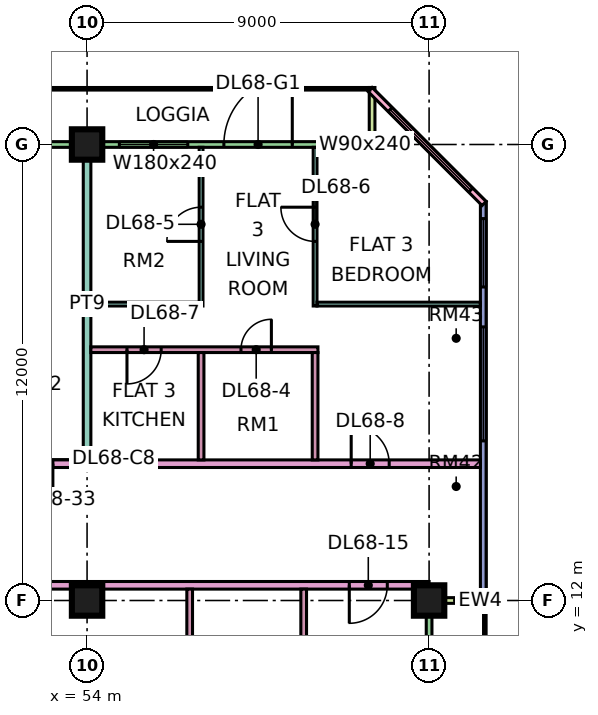
"""IFC4 building model, lengths in metres.
Left out: names, types, materials, properties, quantities, classifications, styles, units other than length and angle.
Written with IfcOpenShell. Run it as: python <this file> out.ifc"""

import sys

from ifc_helpers import new_model, si_unit, direction, frame, frame_2d, origin, origin_2d, place, context, subcontext, project, spatial, rectangle, extrude, element, fill, save


model = new_model("IFC4")
c1 = context("Model", 3, precision=1e-05, world=origin(), true_north=direction((0.0, 1.0)))
c2 = subcontext(c1, "Body", "Model", "MODEL_VIEW")
j1 = project(units=[si_unit("LENGTHUNIT", "METRE"), si_unit("PLANEANGLEUNIT", "RADIAN")], contexts=[c1])
p1 = place(None, origin())
s1 = spatial("IfcSite", under=j1, at=p1, CompositionType="ELEMENT")
p2 = place(p1, origin())
s2 = spatial("IfcBuilding", under=s1, at=p2, CompositionType="ELEMENT")
p3 = place(p2, frame((0.0, 0.0, 292.15)))
s3 = spatial("IfcBuildingStorey", under=s2, at=p3, CompositionType="ELEMENT", Elevation=292.15)
for number, where, z_axis, x_axis in (
    (1, (54.0, 12.0, 0.0), (0.0, 0.0, 1.0), (1.0, 0.0, 0.0)),
    (2, (54.0, 24.0, 0.0), (0.0, 0.0, 1.0), (1.0, 0.0, 0.0)),
    (3, (63.0, 12.0, 0.0), (0.0, 0.0, 1.0), (1.0, 0.0, 0.0)),
):
    element("IfcColumn", number, at=place(p3, frame(where, z_axis=z_axis, x_axis=x_axis)), inside=s3, PredefinedType="COLUMN", context=c2, shape_type="SweptSolid", body=[
        extrude(rectangle(XDim=0.8, YDim=0.8, at=origin_2d()), origin(), (0.0, 0.0, 1.0), 3.75),
    ])
p4 = place(p3, frame((61.425, 24.0, 0.0), z_axis=(0.0, 0.0, 1.0), x_axis=(-1.0, 0.0, 0.0)))
e4 = element("IfcWall", 4, at=p4, inside=s3, PredefinedType="SOLIDWALL", context=c2, shape_type="SweptSolid", body=[
    extrude(rectangle(XDim=13.35, YDim=0.15, at=frame_2d((6.675, 0.0))), origin(), (0.0, 0.0, 1.0), 3.35),
])
p5 = place(p4, frame((0.262, 0.0, 0.45)))
e5 = element("IfcOpeningElement", 5, at=p5, cuts=e4, PredefinedType="OPENING", context=c2, shape_type="SweptSolid", body=[
    extrude(rectangle(XDim=0.9, YDim=2.4, at=frame_2d((0.45, 1.2))), frame((0.0, 0.085, 0.0), z_axis=(0.0, -1.0, 0.0), x_axis=(1.0, 0.0, 0.0)), (0.0, 0.0, 1.0), 0.17),
])
p6 = place(p4, frame((2.025, 0.0, 0.0)))
e6 = element("IfcOpeningElement", 6, at=p6, cuts=e4, PredefinedType="OPENING", context=c2, shape_type="SweptSolid", body=[
    extrude(rectangle(XDim=1.8, YDim=2.4, at=frame_2d((0.9, 1.2))), frame((0.0, 0.085, 0.0), z_axis=(0.0, -1.0, 0.0), x_axis=(1.0, 0.0, 0.0)), (0.0, 0.0, 1.0), 0.17),
])
p7 = place(p4, frame((4.775, 0.0, 0.45)))
e7 = element("IfcOpeningElement", 7, at=p7, cuts=e4, PredefinedType="OPENING", context=c2, shape_type="SweptSolid", body=[
    extrude(rectangle(XDim=1.8, YDim=2.4, at=frame_2d((0.9, 1.2))), frame((0.0, 0.085, 0.0), z_axis=(0.0, -1.0, 0.0), x_axis=(1.0, 0.0, 0.0)), (0.0, 0.0, 1.0), 0.17),
])
p8 = place(p4, frame((8.538, 0.0, 0.45)))
e8 = element("IfcOpeningElement", 8, at=p8, cuts=e4, PredefinedType="OPENING", context=c2, shape_type="SweptSolid", body=[
    extrude(rectangle(XDim=4.2, YDim=2.4, at=frame_2d((2.1, 1.2))), frame((0.0, 0.085, 0.0), z_axis=(0.0, -1.0, 0.0), x_axis=(1.0, 0.0, 0.0)), (0.0, 0.0, 1.0), 0.17),
])
p9 = place(p3, frame((61.5, 25.5, 0.0), z_axis=(0.0, 0.0, 1.0), x_axis=(0.0, -1.0, 0.0)))
e9 = element("IfcWall", 9, at=p9, inside=s3, PredefinedType="SOLIDWALL", context=c2, shape_type="SweptSolid", body=[
    extrude(rectangle(XDim=1.5, YDim=0.15, at=frame_2d((0.75, 0.0))), origin(), (0.0, 0.0, 1.0), 3.35),
])
p10 = place(p3, frame((63.0, 1.575, 0.0), z_axis=(0.0, 0.0, 1.0), x_axis=(0.0, 1.0, 0.0)))
e10 = element("IfcWall", 10, at=p10, inside=s3, PredefinedType="SOLIDWALL", context=c2, shape_type="SweptSolid", body=[
    extrude(rectangle(XDim=10.35, YDim=0.15, at=frame_2d((5.175, 0.0))), origin(), (0.0, 0.0, 1.0), 3.35),
])
p11 = place(p10, frame((1.812, 0.0, 0.0)))
e11 = element("IfcOpeningElement", 11, at=p11, cuts=e10, PredefinedType="OPENING", context=c2, shape_type="SweptSolid", body=[
    extrude(rectangle(XDim=1.8, YDim=2.4, at=frame_2d((0.9, 1.2))), frame((0.0, 0.085, 0.0), z_axis=(0.0, -1.0, 0.0), x_axis=(1.0, 0.0, 0.0)), (0.0, 0.0, 1.0), 0.17),
])
p12 = place(p10, frame((6.175, 0.0, 0.45)))
e12 = element("IfcOpeningElement", 12, at=p12, cuts=e10, PredefinedType="OPENING", context=c2, shape_type="SweptSolid", body=[
    extrude(rectangle(XDim=3.0, YDim=2.4, at=frame_2d((1.5, 1.2))), frame((0.0, 0.085, 0.0), z_axis=(0.0, -1.0, 0.0), x_axis=(1.0, 0.0, 0.0)), (0.0, 0.0, 1.0), 0.17),
])
p13 = place(p3, frame((64.5, 12.0, 0.0), z_axis=(0.0, 0.0, 1.0), x_axis=(-1.0, 0.0, 0.0)))
e13 = element("IfcWall", 13, at=p13, inside=s3, PredefinedType="SOLIDWALL", context=c2, shape_type="SweptSolid", body=[
    extrude(rectangle(XDim=1.5, YDim=0.15, at=frame_2d((0.75, 0.0))), origin(), (0.0, 0.0, 1.0), 3.35),
])
p14 = place(p3, frame((64.425, 12.075, 0.0), z_axis=(0.0, 0.0, 1.0), x_axis=(0.0, 1.0, 0.0)))
e14 = element("IfcWall", 14, at=p14, inside=s3, PredefinedType="SOLIDWALL", context=c2, shape_type="SweptSolid", body=[
    extrude(rectangle(XDim=10.425, YDim=0.15, at=frame_2d((5.212, 0.0))), origin(), (0.0, 0.0, 1.0), 3.35),
])
p15 = place(p14, frame((4.125, 0.0, 0.45)))
e15 = element("IfcOpeningElement", 15, at=p15, cuts=e14, PredefinedType="OPENING", context=c2, shape_type="SweptSolid", body=[
    extrude(rectangle(XDim=3.0, YDim=2.4, at=frame_2d((1.5, 1.2))), frame((0.0, 0.085, 0.0), z_axis=(0.0, -1.0, 0.0), x_axis=(1.0, 0.0, 0.0)), (0.0, 0.0, 1.0), 0.17),
])
p16 = place(p14, frame((8.175, 0.0, 0.45)))
e16 = element("IfcOpeningElement", 16, at=p16, cuts=e14, PredefinedType="OPENING", context=c2, shape_type="SweptSolid", body=[
    extrude(rectangle(XDim=1.8, YDim=2.4, at=frame_2d((0.9, 1.2))), frame((0.0, 0.085, 0.0), z_axis=(0.0, -1.0, 0.0), x_axis=(1.0, 0.0, 0.0)), (0.0, 0.0, 1.0), 0.17),
])
p17 = place(p3, frame((64.447, 22.447, 0.0), z_axis=(0.0, 0.0, 1.0), x_axis=(-0.707106781187, 0.707106781187, 0.0)))
e17 = element("IfcWall", 17, at=p17, inside=s3, PredefinedType="SOLIDWALL", context=c2, shape_type="SweptSolid", body=[
    extrude(rectangle(XDim=4.243, YDim=0.15, at=frame_2d((2.121, 0.0))), origin(), (0.0, 0.0, 1.0), 3.35),
])
p18 = place(p17, frame((0.498, 0.0, 0.45)))
e18 = element("IfcOpeningElement", 18, at=p18, cuts=e17, PredefinedType="OPENING", context=c2, shape_type="SweptSolid", body=[
    extrude(rectangle(XDim=3.0, YDim=2.4, at=frame_2d((1.5, 1.2))), frame((0.0, 0.085, 0.0), z_axis=(0.0, -1.0, 0.0), x_axis=(1.0, 0.0, 0.0)), (0.0, 0.0, 1.0), 0.17),
])
p19 = place(p3, frame((40.65, 12.4, 0.0), z_axis=(0.0, 0.0, 1.0), x_axis=(1.0, 0.0, 0.0)))
e19 = element("IfcWall", 19, at=p19, inside=s3, PredefinedType="PARTITIONING", context=c2, shape_type="SweptSolid", body=[
    extrude(rectangle(XDim=22.35, YDim=0.2, at=frame_2d((11.175, 0.0))), origin(), (0.0, 0.0, 1.0), 3.35),
])
p20 = place(p19, frame((20.25, 0.0, 0.0)))
e20 = element("IfcOpeningElement", 20, at=p20, cuts=e19, PredefinedType="OPENING", context=c2, shape_type="SweptSolid", body=[
    extrude(rectangle(XDim=1.0, YDim=2.1, at=frame_2d((0.5, 1.05))), frame((0.0, 0.11, 0.0), z_axis=(0.0, -1.0, 0.0), x_axis=(1.0, 0.0, 0.0)), (0.0, 0.0, 1.0), 0.22),
])
p21 = place(p19, frame((1.05, 0.0, 0.0)))
e21 = element("IfcOpeningElement", 21, at=p21, cuts=e19, PredefinedType="OPENING", context=c2, shape_type="SweptSolid", body=[
    extrude(rectangle(XDim=1.0, YDim=2.1, at=frame_2d((0.5, 1.05))), frame((0.0, 0.11, 0.0), z_axis=(0.0, -1.0, 0.0), x_axis=(1.0, 0.0, 0.0)), (0.0, 0.0, 1.0), 0.22),
])
p22 = place(p3, frame((51.225, 15.6, 0.0), z_axis=(0.0, 0.0, 1.0), x_axis=(1.0, 0.0, 0.0)))
e22 = element("IfcWall", 22, at=p22, inside=s3, PredefinedType="PARTITIONING", context=c2, shape_type="SweptSolid", body=[
    extrude(rectangle(XDim=13.125, YDim=0.2, at=frame_2d((6.562, 0.0))), origin(), (0.0, 0.0, 1.0), 3.35),
])
p23 = place(p22, frame((9.725, 0.0, 0.0)))
e23 = element("IfcOpeningElement", 23, at=p23, cuts=e22, PredefinedType="OPENING", context=c2, shape_type="SweptSolid", body=[
    extrude(rectangle(XDim=1.0, YDim=2.1, at=frame_2d((0.5, 1.05))), frame((0.0, 0.11, 0.0), z_axis=(0.0, -1.0, 0.0), x_axis=(1.0, 0.0, 0.0)), (0.0, 0.0, 1.0), 0.22),
])
p24 = place(p22, frame((0.875, 0.0, 0.0)))
e24 = element("IfcOpeningElement", 24, at=p24, cuts=e22, PredefinedType="OPENING", context=c2, shape_type="SweptSolid", body=[
    extrude(rectangle(XDim=1.0, YDim=2.1, at=frame_2d((0.5, 1.05))), frame((0.0, 0.11, 0.0), z_axis=(0.0, -1.0, 0.0), x_axis=(1.0, 0.0, 0.0)), (0.0, 0.0, 1.0), 0.22),
])
p25 = place(p3, frame((54.0, 15.7, 0.0), z_axis=(0.0, 0.0, 1.0), x_axis=(0.0, 1.0, 0.0)))
e25 = element("IfcWall", 25, at=p25, inside=s3, PredefinedType="PARTITIONING", context=c2, shape_type="SweptSolid", body=[
    extrude(rectangle(XDim=8.226, YDim=0.2, at=frame_2d((4.113, 0.0))), origin(), (0.0, 0.0, 1.0), 3.35),
])
p26 = place(p3, frame((54.1, 18.6, 0.0), z_axis=(0.0, 0.0, 1.0), x_axis=(1.0, 0.0, 0.0)))
e26 = element("IfcWall", 26, at=p26, inside=s3, PredefinedType="PARTITIONING", context=c2, shape_type="SweptSolid", body=[
    extrude(rectangle(XDim=5.975, YDim=0.15, at=frame_2d((2.987, 0.0))), origin(), (0.0, 0.0, 1.0), 3.35),
])
p27 = place(p26, frame((3.95, 0.0, 0.0)))
e27 = element("IfcOpeningElement", 27, at=p27, cuts=e26, PredefinedType="OPENING", context=c2, shape_type="SweptSolid", body=[
    extrude(rectangle(XDim=0.8, YDim=2.1, at=frame_2d((0.4, 1.05))), frame((0.0, 0.085, 0.0), z_axis=(0.0, -1.0, 0.0), x_axis=(1.0, 0.0, 0.0)), (0.0, 0.0, 1.0), 0.17),
])
p28 = place(p26, frame((0.95, 0.0, 0.0)))
e28 = element("IfcOpeningElement", 28, at=p28, cuts=e26, PredefinedType="OPENING", context=c2, shape_type="SweptSolid", body=[
    extrude(rectangle(XDim=0.9, YDim=2.1, at=frame_2d((0.45, 1.05))), frame((0.0, 0.085, 0.0), z_axis=(0.0, -1.0, 0.0), x_axis=(1.0, 0.0, 0.0)), (0.0, 0.0, 1.0), 0.17),
])
p29 = place(p3, frame((54.1, 19.8, 0.0), z_axis=(0.0, 0.0, 1.0), x_axis=(1.0, 0.0, 0.0)))
e29 = element("IfcWall", 29, at=p29, inside=s3, PredefinedType="PARTITIONING", context=c2, shape_type="SweptSolid", body=[
    extrude(rectangle(XDim=2.85, YDim=0.1, at=frame_2d((1.425, 0.0))), origin(), (0.0, 0.0, 1.0), 3.35),
])
p30 = place(p3, frame((56.7, 8.275, 0.0), z_axis=(0.0, 0.0, 1.0), x_axis=(0.0, 1.0, 0.0)))
e30 = element("IfcWall", 30, at=p30, inside=s3, PredefinedType="PARTITIONING", context=c2, shape_type="SweptSolid", body=[
    extrude(rectangle(XDim=4.025, YDim=0.15, at=frame_2d((2.013, 0.0))), origin(), (0.0, 0.0, 1.0), 3.35),
])
p31 = place(p3, frame((57.0, 15.7, 0.0), z_axis=(0.0, 0.0, 1.0), x_axis=(0.0, 1.0, 0.0)))
e31 = element("IfcWall", 31, at=p31, inside=s3, PredefinedType="PARTITIONING", context=c2, shape_type="SweptSolid", body=[
    extrude(rectangle(XDim=2.825, YDim=0.15, at=frame_2d((1.413, 0.0))), origin(), (0.0, 0.0, 1.0), 3.35),
])
p32 = place(p3, frame((57.0, 19.75, 0.0), z_axis=(0.0, 0.0, 1.0), x_axis=(0.0, 1.0, 0.0)))
e32 = element("IfcWall", 32, at=p32, inside=s3, PredefinedType="PARTITIONING", context=c2, shape_type="SweptSolid", body=[
    extrude(rectangle(XDim=4.176, YDim=0.1, at=frame_2d((2.088, 0.0))), origin(), (0.0, 0.0, 1.0), 3.35),
])
p33 = place(p32, frame((1.7, 0.0, 0.0)))
e33 = element("IfcOpeningElement", 33, at=p33, cuts=e32, PredefinedType="OPENING", context=c2, shape_type="SweptSolid", body=[
    extrude(rectangle(XDim=0.9, YDim=2.1, at=frame_2d((0.45, 1.05))), frame((0.0, 0.06, 0.0), z_axis=(0.0, -1.0, 0.0), x_axis=(1.0, 0.0, 0.0)), (0.0, 0.0, 1.0), 0.12),
])
p34 = place(p3, frame((59.7, 8.275, 0.0), z_axis=(0.0, 0.0, 1.0), x_axis=(0.0, 1.0, 0.0)))
e34 = element("IfcWall", 34, at=p34, inside=s3, PredefinedType="PARTITIONING", context=c2, shape_type="SweptSolid", body=[
    extrude(rectangle(XDim=4.025, YDim=0.15, at=frame_2d((2.013, 0.0))), origin(), (0.0, 0.0, 1.0), 3.35),
])
p35 = place(p3, frame((60.0, 15.7, 0.0), z_axis=(0.0, 0.0, 1.0), x_axis=(0.0, 1.0, 0.0)))
e35 = element("IfcWall", 35, at=p35, inside=s3, PredefinedType="PARTITIONING", context=c2, shape_type="SweptSolid", body=[
    extrude(rectangle(XDim=2.825, YDim=0.15, at=frame_2d((1.413, 0.0))), origin(), (0.0, 0.0, 1.0), 3.35),
])
p36 = place(p3, frame((60.0, 19.75, 0.0), z_axis=(0.0, 0.0, 1.0), x_axis=(0.0, 1.0, 0.0)))
e36 = element("IfcWall", 36, at=p36, inside=s3, PredefinedType="PARTITIONING", context=c2, shape_type="SweptSolid", body=[
    extrude(rectangle(XDim=4.176, YDim=0.1, at=frame_2d((2.088, 0.0))), origin(), (0.0, 0.0, 1.0), 3.35),
])
p37 = place(p36, frame((1.7, 0.0, 0.0)))
e37 = element("IfcOpeningElement", 37, at=p37, cuts=e36, PredefinedType="OPENING", context=c2, shape_type="SweptSolid", body=[
    extrude(rectangle(XDim=0.9, YDim=2.1, at=frame_2d((0.45, 1.05))), frame((0.0, 0.06, 0.0), z_axis=(0.0, -1.0, 0.0), x_axis=(1.0, 0.0, 0.0)), (0.0, 0.0, 1.0), 0.12),
])
p38 = place(p3, frame((60.05, 19.8, 0.0), z_axis=(0.0, 0.0, 1.0), x_axis=(1.0, 0.0, 0.0)))
e38 = element("IfcWall", 38, at=p38, inside=s3, PredefinedType="PARTITIONING", context=c2, shape_type="SweptSolid", body=[
    extrude(rectangle(XDim=4.3, YDim=0.1, at=frame_2d((2.15, 0.0))), origin(), (0.0, 0.0, 1.0), 3.35),
])
p39 = place(p5, origin())
e39 = element("IfcWindow", 39, at=p39, inside=s3, PartitioningType="SINGLE_PANEL", PredefinedType="WINDOW", context=c2, shape_type="SweptSolid", body=[
    extrude(rectangle(XDim=0.9, YDim=2.4, at=frame_2d((0.45, 1.2))), frame((0.0, 0.03, 0.0), z_axis=(0.0, -1.0, 0.0), x_axis=(1.0, 0.0, 0.0)), (0.0, 0.0, 1.0), 0.06),
])
fill(e5, e39)
p40 = place(p6, frame((1.8, 0.0, 0.0), z_axis=(0.0, 0.0, 1.0), x_axis=(-1.0, 0.0, 0.0)))
e40 = element("IfcDoor", 40, at=p40, inside=s3, OperationType="DOUBLE_DOOR_SINGLE_SWING", PredefinedType="DOOR", context=c2, shape_type="SweptSolid", body=[
    extrude(rectangle(XDim=1.8, YDim=2.4, at=frame_2d((0.9, 1.2))), frame((0.0, 0.025, 0.0), z_axis=(0.0, -1.0, 0.0), x_axis=(1.0, 0.0, 0.0)), (0.0, 0.0, 1.0), 0.05),
])
fill(e6, e40)
p41 = place(p7, origin())
e41 = element("IfcWindow", 41, at=p41, inside=s3, PartitioningType="SINGLE_PANEL", PredefinedType="WINDOW", context=c2, shape_type="SweptSolid", body=[
    extrude(rectangle(XDim=1.8, YDim=2.4, at=frame_2d((0.9, 1.2))), frame((0.0, 0.03, 0.0), z_axis=(0.0, -1.0, 0.0), x_axis=(1.0, 0.0, 0.0)), (0.0, 0.0, 1.0), 0.06),
])
fill(e7, e41)
p42 = place(p15, origin())
e42 = element("IfcWindow", 42, at=p42, inside=s3, PartitioningType="SINGLE_PANEL", PredefinedType="WINDOW", context=c2, shape_type="SweptSolid", body=[
    extrude(rectangle(XDim=3.0, YDim=2.4, at=frame_2d((1.5, 1.2))), frame((0.0, 0.03, 0.0), z_axis=(0.0, -1.0, 0.0), x_axis=(1.0, 0.0, 0.0)), (0.0, 0.0, 1.0), 0.06),
])
fill(e15, e42)
p43 = place(p16, origin())
e43 = element("IfcWindow", 43, at=p43, inside=s3, PartitioningType="SINGLE_PANEL", PredefinedType="WINDOW", context=c2, shape_type="SweptSolid", body=[
    extrude(rectangle(XDim=1.8, YDim=2.4, at=frame_2d((0.9, 1.2))), frame((0.0, 0.03, 0.0), z_axis=(0.0, -1.0, 0.0), x_axis=(1.0, 0.0, 0.0)), (0.0, 0.0, 1.0), 0.06),
])
fill(e16, e43)
p44 = place(p18, origin())
e44 = element("IfcWindow", 44, at=p44, inside=s3, PartitioningType="SINGLE_PANEL", PredefinedType="WINDOW", context=c2, shape_type="SweptSolid", body=[
    extrude(rectangle(XDim=3.0, YDim=2.4, at=frame_2d((1.5, 1.2))), frame((0.0, 0.03, 0.0), z_axis=(0.0, -1.0, 0.0), x_axis=(1.0, 0.0, 0.0)), (0.0, 0.0, 1.0), 0.06),
])
fill(e18, e44)
p45 = place(p27, frame((0.8, 0.0, 0.0), z_axis=(0.0, 0.0, 1.0), x_axis=(-1.0, 0.0, 0.0)))
e45 = element("IfcDoor", 45, at=p45, inside=s3, OperationType="SINGLE_SWING_RIGHT", PredefinedType="DOOR", context=c2, shape_type="SweptSolid", body=[
    extrude(rectangle(XDim=0.8, YDim=2.1, at=frame_2d((0.4, 1.05))), frame((0.0, 0.025, 0.0), z_axis=(0.0, -1.0, 0.0), x_axis=(1.0, 0.0, 0.0)), (0.0, 0.0, 1.0), 0.05),
])
fill(e27, e45)
p46 = place(p33, origin())
e46 = element("IfcDoor", 46, at=p46, inside=s3, OperationType="SINGLE_SWING_LEFT", PredefinedType="DOOR", context=c2, shape_type="SweptSolid", body=[
    extrude(rectangle(XDim=0.9, YDim=2.1, at=frame_2d((0.45, 1.05))), frame((0.0, 0.025, 0.0), z_axis=(0.0, -1.0, 0.0), x_axis=(1.0, 0.0, 0.0)), (0.0, 0.0, 1.0), 0.05),
])
fill(e33, e46)
p47 = place(p37, frame((0.9, 0.0, 0.0), z_axis=(0.0, 0.0, 1.0), x_axis=(-1.0, 0.0, 0.0)))
e47 = element("IfcDoor", 47, at=p47, inside=s3, OperationType="SINGLE_SWING_RIGHT", PredefinedType="DOOR", context=c2, shape_type="SweptSolid", body=[
    extrude(rectangle(XDim=0.9, YDim=2.1, at=frame_2d((0.45, 1.05))), frame((0.0, 0.025, 0.0), z_axis=(0.0, -1.0, 0.0), x_axis=(1.0, 0.0, 0.0)), (0.0, 0.0, 1.0), 0.05),
])
fill(e37, e47)
p48 = place(p28, frame((0.9, 0.0, 0.0), z_axis=(0.0, 0.0, 1.0), x_axis=(-1.0, 0.0, 0.0)))
e48 = element("IfcDoor", 48, at=p48, inside=s3, OperationType="SINGLE_SWING_LEFT", PredefinedType="DOOR", context=c2, shape_type="SweptSolid", body=[
    extrude(rectangle(XDim=0.9, YDim=2.1, at=frame_2d((0.45, 1.05))), frame((0.0, 0.025, 0.0), z_axis=(0.0, -1.0, 0.0), x_axis=(1.0, 0.0, 0.0)), (0.0, 0.0, 1.0), 0.05),
])
fill(e28, e48)
p49 = place(p23, origin())
e49 = element("IfcDoor", 49, at=p49, inside=s3, OperationType="SINGLE_SWING_LEFT", PredefinedType="DOOR", context=c2, shape_type="SweptSolid", body=[
    extrude(rectangle(XDim=1.0, YDim=2.1, at=frame_2d((0.5, 1.05))), frame((0.0, 0.025, 0.0), z_axis=(0.0, -1.0, 0.0), x_axis=(1.0, 0.0, 0.0)), (0.0, 0.0, 1.0), 0.05),
])
fill(e23, e49)
p50 = place(p20, frame((1.0, 0.0, 0.0), z_axis=(0.0, 0.0, 1.0), x_axis=(-1.0, 0.0, 0.0)))
e50 = element("IfcDoor", 50, at=p50, inside=s3, OperationType="SINGLE_SWING_LEFT", PredefinedType="DOOR", context=c2, shape_type="SweptSolid", body=[
    extrude(rectangle(XDim=1.0, YDim=2.1, at=frame_2d((0.5, 1.05))), frame((0.0, 0.025, 0.0), z_axis=(0.0, -1.0, 0.0), x_axis=(1.0, 0.0, 0.0)), (0.0, 0.0, 1.0), 0.05),
])
fill(e20, e50)
p51 = place(p24, origin())
e51 = element("IfcDoor", 51, at=p51, inside=s3, OperationType="SINGLE_SWING_RIGHT", PredefinedType="DOOR", context=c2, shape_type="SweptSolid", body=[
    extrude(rectangle(XDim=1.0, YDim=2.1, at=frame_2d((0.5, 1.05))), frame((0.0, 0.025, 0.0), z_axis=(0.0, -1.0, 0.0), x_axis=(1.0, 0.0, 0.0)), (0.0, 0.0, 1.0), 0.05),
])
fill(e24, e51)
save(model, sys.argv[1])
